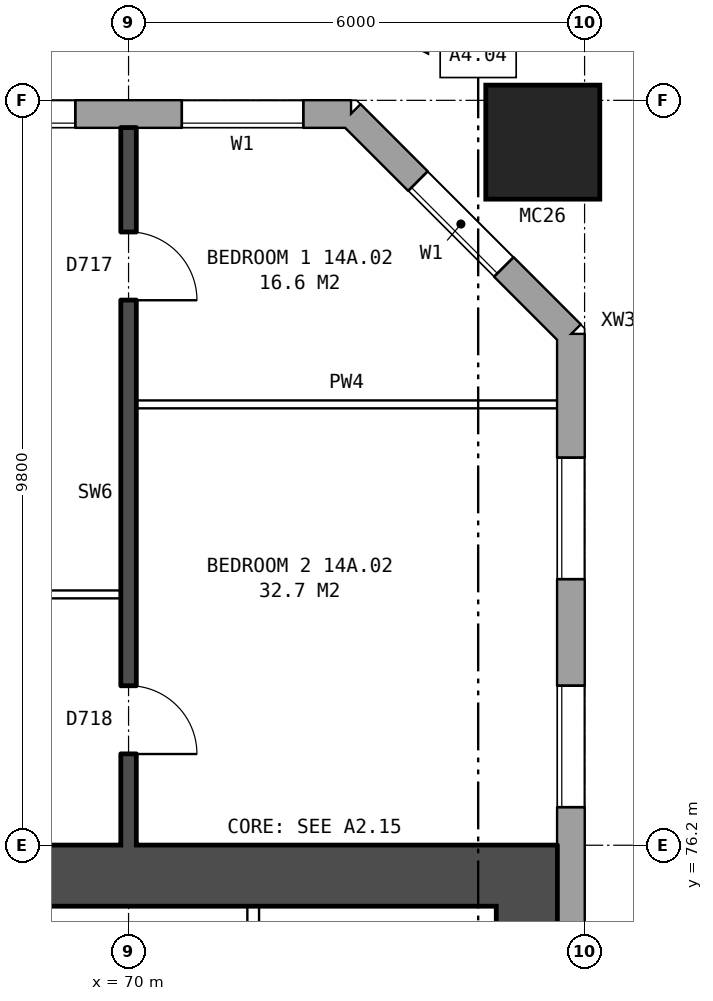
"""IFC4 building model, lengths in metres.
Left out: names, types, materials, properties, quantities, classifications, styles, units other than length and angle.
Written with IfcOpenShell. Run it as: python <this file> out.ifc"""

import sys

from ifc_helpers import new_model, si_unit, direction, frame, frame_2d, origin, origin_2d, place, context, subcontext, project, spatial, rectangle, hollow_rectangle, extrude, element, fill, save


model = new_model("IFC4")
c1 = context("Model", 3, precision=1e-05, world=origin(), true_north=direction((0.0, 1.0)))
c2 = subcontext(c1, "Body", "Model", "MODEL_VIEW")
j1 = project(units=[si_unit("LENGTHUNIT", "METRE"), si_unit("PLANEANGLEUNIT", "RADIAN")], contexts=[c1])
p1 = place(None, origin())
s1 = spatial("IfcSite", under=j1, at=p1, CompositionType="ELEMENT")
p2 = place(p1, origin())
s2 = spatial("IfcBuilding", under=s1, at=p2, CompositionType="ELEMENT")
p3 = place(p2, frame((0.0, 0.0, 53.6)))
s3 = spatial("IfcBuildingStorey", under=s2, at=p3, CompositionType="ELEMENT", Elevation=53.6)
p4 = place(p3, frame((75.45, 85.45, 0.0), z_axis=(0.0, 0.0, 1.0), x_axis=(1.0, 0.0, 0.0)))
e1 = element("IfcColumn", 1, at=p4, inside=s3, PredefinedType="COLUMN", context=c2, shape_type="SweptSolid", body=[
    extrude(hollow_rectangle(XDim=1.5, YDim=1.5, WallThickness=0.08, at=origin_2d()), origin(), (0.0, 0.0, 1.0), 3.1),
])
p5 = place(p3, frame((75.82, 57.075, 0.0), z_axis=(0.0, 0.0, 1.0), x_axis=(0.0, 1.0, 0.0)))
e2 = element("IfcWall", 2, at=p5, inside=s3, PredefinedType="STANDARD", context=c2, shape_type="SweptSolid", body=[
    extrude(rectangle(XDim=25.851, YDim=0.36, at=frame_2d((12.925, 0.0))), origin(), (0.0, 0.0, 1.0), 2.85),
])
p6 = place(p5, frame((1.625, 0.0, 0.8)))
e3 = element("IfcOpeningElement", 3, at=p6, cuts=e2, PredefinedType="OPENING", context=c2, shape_type="SweptSolid", body=[
    extrude(rectangle(XDim=1.6, YDim=1.8, at=frame_2d((0.8, 0.9))), frame((0.0, 0.19, 0.0), z_axis=(0.0, -1.0, 0.0), x_axis=(1.0, 0.0, 0.0)), (0.0, 0.0, 1.0), 0.38),
])
p7 = place(p5, frame((4.625, 0.0, 0.8)))
e4 = element("IfcOpeningElement", 4, at=p7, cuts=e2, PredefinedType="OPENING", context=c2, shape_type="SweptSolid", body=[
    extrude(rectangle(XDim=1.6, YDim=1.8, at=frame_2d((0.8, 0.9))), frame((0.0, 0.19, 0.0), z_axis=(0.0, -1.0, 0.0), x_axis=(1.0, 0.0, 0.0)), (0.0, 0.0, 1.0), 0.38),
])
p8 = place(p5, frame((19.625, 0.0, 0.8)))
e5 = element("IfcOpeningElement", 5, at=p8, cuts=e2, PredefinedType="OPENING", context=c2, shape_type="SweptSolid", body=[
    extrude(rectangle(XDim=1.6, YDim=1.8, at=frame_2d((0.8, 0.9))), frame((0.0, 0.19, 0.0), z_axis=(0.0, -1.0, 0.0), x_axis=(1.0, 0.0, 0.0)), (0.0, 0.0, 1.0), 0.38),
])
p9 = place(p5, frame((22.625, 0.0, 0.8)))
e6 = element("IfcOpeningElement", 6, at=p9, cuts=e2, PredefinedType="OPENING", context=c2, shape_type="SweptSolid", body=[
    extrude(rectangle(XDim=1.6, YDim=1.8, at=frame_2d((0.8, 0.9))), frame((0.0, 0.19, 0.0), z_axis=(0.0, -1.0, 0.0), x_axis=(1.0, 0.0, 0.0)), (0.0, 0.0, 1.0), 0.38),
])
p10 = place(p3, frame((75.82, 82.925, 0.0), z_axis=(0.0, 0.0, 1.0), x_axis=(-0.707106781187, 0.707106781187, 0.0)))
e7 = element("IfcWall", 7, at=p10, inside=s3, PredefinedType="STANDARD", context=c2, shape_type="SweptSolid", body=[
    extrude(rectangle(XDim=4.094, YDim=0.36, at=frame_2d((2.047, 0.0))), origin(), (0.0, 0.0, 1.0), 2.85),
])
p11 = place(p10, frame((1.247, 0.0, 0.8)))
e8 = element("IfcOpeningElement", 8, at=p11, cuts=e7, PredefinedType="OPENING", context=c2, shape_type="SweptSolid", body=[
    extrude(rectangle(XDim=1.6, YDim=1.8, at=frame_2d((0.8, 0.9))), frame((0.0, 0.19, 0.0), z_axis=(0.0, -1.0, 0.0), x_axis=(1.0, 0.0, 0.0)), (0.0, 0.0, 1.0), 0.38),
])
p12 = place(p3, frame((72.925, 85.82, 0.0), z_axis=(0.0, 0.0, 1.0), x_axis=(-1.0, 0.0, 0.0)))
e9 = element("IfcWall", 9, at=p12, inside=s3, PredefinedType="STANDARD", context=c2, shape_type="SweptSolid", body=[
    extrude(rectangle(XDim=48.351, YDim=0.36, at=frame_2d((24.175, 0.0))), origin(), (0.0, 0.0, 1.0), 2.85),
])
p13 = place(p12, frame((0.625, 0.0, 0.8)))
e10 = element("IfcOpeningElement", 10, at=p13, cuts=e9, PredefinedType="OPENING", context=c2, shape_type="SweptSolid", body=[
    extrude(rectangle(XDim=1.6, YDim=1.8, at=frame_2d((0.8, 0.9))), frame((0.0, 0.19, 0.0), z_axis=(0.0, -1.0, 0.0), x_axis=(1.0, 0.0, 0.0)), (0.0, 0.0, 1.0), 0.38),
])
p14 = place(p12, frame((3.625, 0.0, 0.8)))
e11 = element("IfcOpeningElement", 11, at=p14, cuts=e9, PredefinedType="OPENING", context=c2, shape_type="SweptSolid", body=[
    extrude(rectangle(XDim=1.6, YDim=1.8, at=frame_2d((0.8, 0.9))), frame((0.0, 0.19, 0.0), z_axis=(0.0, -1.0, 0.0), x_axis=(1.0, 0.0, 0.0)), (0.0, 0.0, 1.0), 0.38),
])
p15 = place(p12, frame((6.625, 0.0, 0.8)))
e12 = element("IfcOpeningElement", 12, at=p15, cuts=e9, PredefinedType="OPENING", context=c2, shape_type="SweptSolid", body=[
    extrude(rectangle(XDim=1.6, YDim=1.8, at=frame_2d((0.8, 0.9))), frame((0.0, 0.19, 0.0), z_axis=(0.0, -1.0, 0.0), x_axis=(1.0, 0.0, 0.0)), (0.0, 0.0, 1.0), 0.38),
])
p16 = place(p12, frame((9.625, 0.0, 0.8)))
e13 = element("IfcOpeningElement", 13, at=p16, cuts=e9, PredefinedType="OPENING", context=c2, shape_type="SweptSolid", body=[
    extrude(rectangle(XDim=1.6, YDim=1.8, at=frame_2d((0.8, 0.9))), frame((0.0, 0.19, 0.0), z_axis=(0.0, -1.0, 0.0), x_axis=(1.0, 0.0, 0.0)), (0.0, 0.0, 1.0), 0.38),
])
p17 = place(p12, frame((12.075, 0.0, 1.55)))
e14 = element("IfcOpeningElement", 14, at=p17, cuts=e9, PredefinedType="OPENING", context=c2, shape_type="SweptSolid", body=[
    extrude(rectangle(XDim=0.6, YDim=0.9, at=frame_2d((0.3, 0.45))), frame((0.0, 0.19, 0.0), z_axis=(0.0, -1.0, 0.0), x_axis=(1.0, 0.0, 0.0)), (0.0, 0.0, 1.0), 0.38),
])
p18 = place(p12, frame((15.625, 0.0, 0.8)))
e15 = element("IfcOpeningElement", 15, at=p18, cuts=e9, PredefinedType="OPENING", context=c2, shape_type="SweptSolid", body=[
    extrude(rectangle(XDim=1.6, YDim=1.8, at=frame_2d((0.8, 0.9))), frame((0.0, 0.19, 0.0), z_axis=(0.0, -1.0, 0.0), x_axis=(1.0, 0.0, 0.0)), (0.0, 0.0, 1.0), 0.38),
])
p19 = place(p12, frame((18.625, 0.0, 0.8)))
e16 = element("IfcOpeningElement", 16, at=p19, cuts=e9, PredefinedType="OPENING", context=c2, shape_type="SweptSolid", body=[
    extrude(rectangle(XDim=1.6, YDim=1.8, at=frame_2d((0.8, 0.9))), frame((0.0, 0.19, 0.0), z_axis=(0.0, -1.0, 0.0), x_axis=(1.0, 0.0, 0.0)), (0.0, 0.0, 1.0), 0.38),
])
p20 = place(p12, frame((21.625, 0.0, 0.8)))
e17 = element("IfcOpeningElement", 17, at=p20, cuts=e9, PredefinedType="OPENING", context=c2, shape_type="SweptSolid", body=[
    extrude(rectangle(XDim=1.6, YDim=1.8, at=frame_2d((0.8, 0.9))), frame((0.0, 0.19, 0.0), z_axis=(0.0, -1.0, 0.0), x_axis=(1.0, 0.0, 0.0)), (0.0, 0.0, 1.0), 0.38),
])
p21 = place(p12, frame((24.625, 0.0, 0.8)))
e18 = element("IfcOpeningElement", 18, at=p21, cuts=e9, PredefinedType="OPENING", context=c2, shape_type="SweptSolid", body=[
    extrude(rectangle(XDim=1.6, YDim=1.8, at=frame_2d((0.8, 0.9))), frame((0.0, 0.19, 0.0), z_axis=(0.0, -1.0, 0.0), x_axis=(1.0, 0.0, 0.0)), (0.0, 0.0, 1.0), 0.38),
])
p22 = place(p12, frame((27.625, 0.0, 0.8)))
e19 = element("IfcOpeningElement", 19, at=p22, cuts=e9, PredefinedType="OPENING", context=c2, shape_type="SweptSolid", body=[
    extrude(rectangle(XDim=1.6, YDim=1.8, at=frame_2d((0.8, 0.9))), frame((0.0, 0.19, 0.0), z_axis=(0.0, -1.0, 0.0), x_axis=(1.0, 0.0, 0.0)), (0.0, 0.0, 1.0), 0.38),
])
p23 = place(p12, frame((30.625, 0.0, 0.8)))
e20 = element("IfcOpeningElement", 20, at=p23, cuts=e9, PredefinedType="OPENING", context=c2, shape_type="SweptSolid", body=[
    extrude(rectangle(XDim=1.6, YDim=1.8, at=frame_2d((0.8, 0.9))), frame((0.0, 0.19, 0.0), z_axis=(0.0, -1.0, 0.0), x_axis=(1.0, 0.0, 0.0)), (0.0, 0.0, 1.0), 0.38),
])
p24 = place(p12, frame((33.125, 0.0, 0.25)))
e21 = element("IfcOpeningElement", 21, at=p24, cuts=e9, PredefinedType="OPENING", context=c2, shape_type="SweptSolid", body=[
    extrude(rectangle(XDim=0.8, YDim=1.5, at=frame_2d((0.4, 0.75))), frame((0.0, 0.19, 0.0), z_axis=(0.0, -1.0, 0.0), x_axis=(1.0, 0.0, 0.0)), (0.0, 0.0, 1.0), 0.38),
])
p25 = place(p12, frame((36.625, 0.0, 0.8)))
e22 = element("IfcOpeningElement", 22, at=p25, cuts=e9, PredefinedType="OPENING", context=c2, shape_type="SweptSolid", body=[
    extrude(rectangle(XDim=1.6, YDim=1.8, at=frame_2d((0.8, 0.9))), frame((0.0, 0.19, 0.0), z_axis=(0.0, -1.0, 0.0), x_axis=(1.0, 0.0, 0.0)), (0.0, 0.0, 1.0), 0.38),
])
p26 = place(p12, frame((39.625, 0.0, 0.8)))
e23 = element("IfcOpeningElement", 23, at=p26, cuts=e9, PredefinedType="OPENING", context=c2, shape_type="SweptSolid", body=[
    extrude(rectangle(XDim=1.6, YDim=1.8, at=frame_2d((0.8, 0.9))), frame((0.0, 0.19, 0.0), z_axis=(0.0, -1.0, 0.0), x_axis=(1.0, 0.0, 0.0)), (0.0, 0.0, 1.0), 0.38),
])
p27 = place(p12, frame((42.625, 0.0, 0.8)))
e24 = element("IfcOpeningElement", 24, at=p27, cuts=e9, PredefinedType="OPENING", context=c2, shape_type="SweptSolid", body=[
    extrude(rectangle(XDim=1.6, YDim=1.8, at=frame_2d((0.8, 0.9))), frame((0.0, 0.19, 0.0), z_axis=(0.0, -1.0, 0.0), x_axis=(1.0, 0.0, 0.0)), (0.0, 0.0, 1.0), 0.38),
])
p28 = place(p12, frame((45.625, 0.0, 0.8)))
e25 = element("IfcOpeningElement", 25, at=p28, cuts=e9, PredefinedType="OPENING", context=c2, shape_type="SweptSolid", body=[
    extrude(rectangle(XDim=1.6, YDim=1.8, at=frame_2d((0.8, 0.9))), frame((0.0, 0.19, 0.0), z_axis=(0.0, -1.0, 0.0), x_axis=(1.0, 0.0, 0.0)), (0.0, 0.0, 1.0), 0.38),
])
p29 = place(p12, frame((13.325, 0.0, 0.15)))
e26 = element("IfcOpeningElement", 26, at=p29, cuts=e9, PredefinedType="OPENING", context=c2, shape_type="SweptSolid", body=[
    extrude(rectangle(XDim=1.4, YDim=0.9, at=frame_2d((0.7, 0.45))), frame((0.0, 0.19, 0.0), z_axis=(0.0, -1.0, 0.0), x_axis=(1.0, 0.0, 0.0)), (0.0, 0.0, 1.0), 0.38),
])
p30 = place(p12, frame((34.225, 0.0, 0.25)))
e27 = element("IfcOpeningElement", 27, at=p30, cuts=e9, PredefinedType="OPENING", context=c2, shape_type="SweptSolid", body=[
    extrude(rectangle(XDim=0.6, YDim=0.9, at=frame_2d((0.3, 0.45))), frame((0.0, 0.19, 0.0), z_axis=(0.0, -1.0, 0.0), x_axis=(1.0, 0.0, 0.0)), (0.0, 0.0, 1.0), 0.38),
])
p31 = place(p3, frame((75.24, 64.6, 0.0), z_axis=(0.0, 0.0, 1.0), x_axis=(0.0, 1.0, 0.0)))
e28 = element("IfcWall", 28, at=p31, inside=s3, PredefinedType="SHEAR", context=c2, shape_type="SweptSolid", body=[
    extrude(rectangle(XDim=10.8, YDim=0.8, at=frame_2d((5.4, 0.0))), origin(), (0.0, 0.0, 1.0), 2.85),
])
p32 = place(p3, frame((66.64, 75.8, 0.0), z_axis=(0.0, 0.0, 1.0), x_axis=(1.0, 0.0, 0.0)))
e29 = element("IfcWall", 29, at=p32, inside=s3, PredefinedType="SHEAR", context=c2, shape_type="SweptSolid", body=[
    extrude(rectangle(XDim=9.0, YDim=0.8, at=frame_2d((4.5, 0.0))), origin(), (0.0, 0.0, 1.0), 2.85),
])
p33 = place(p3, frame((71.64, 73.45, 0.0), z_axis=(0.0, 0.0, 1.0), x_axis=(0.0, 1.0, 0.0)))
e30 = element("IfcWall", 30, at=p33, inside=s3, PredefinedType="PARTITIONING", context=c2, shape_type="SweptSolid", body=[
    extrude(rectangle(XDim=1.95, YDim=0.15, at=frame_2d((0.975, 0.0))), origin(), (0.0, 0.0, 1.0), 2.85),
])
p34 = place(p33, frame((0.55, 0.0, 0.0)))
e31 = element("IfcOpeningElement", 31, at=p34, cuts=e30, PredefinedType="OPENING", context=c2, shape_type="SweptSolid", body=[
    extrude(rectangle(XDim=0.85, YDim=2.1, at=frame_2d((0.425, 1.05))), frame((0.0, 0.085, 0.0), z_axis=(0.0, -1.0, 0.0), x_axis=(1.0, 0.0, 0.0)), (0.0, 0.0, 1.0), 0.17),
])
p35 = place(p3, frame((64.1, 79.5, 0.0), z_axis=(0.0, 0.0, 1.0), x_axis=(1.0, 0.0, 0.0)))
e32 = element("IfcWall", 32, at=p35, inside=s3, PredefinedType="PARTITIONING", context=c2, shape_type="SweptSolid", body=[
    extrude(rectangle(XDim=5.8, YDim=0.1, at=frame_2d((2.9, 0.0))), origin(), (0.0, 0.0, 1.0), 2.85),
])
p36 = place(p35, frame((3.6, 0.0, 0.0)))
e33 = element("IfcOpeningElement", 33, at=p36, cuts=e32, PredefinedType="OPENING", context=c2, shape_type="SweptSolid", body=[
    extrude(rectangle(XDim=0.9, YDim=2.1, at=frame_2d((0.45, 1.05))), frame((0.0, 0.06, 0.0), z_axis=(0.0, -1.0, 0.0), x_axis=(1.0, 0.0, 0.0)), (0.0, 0.0, 1.0), 0.12),
])
p37 = place(p35, frame((0.7, 0.0, 0.0)))
e34 = element("IfcOpeningElement", 34, at=p37, cuts=e32, PredefinedType="OPENING", context=c2, shape_type="SweptSolid", body=[
    extrude(rectangle(XDim=0.9, YDim=2.1, at=frame_2d((0.45, 1.05))), frame((0.0, 0.06, 0.0), z_axis=(0.0, -1.0, 0.0), x_axis=(1.0, 0.0, 0.0)), (0.0, 0.0, 1.0), 0.12),
])
p38 = place(p3, frame((70.1, 82.0, 0.0), z_axis=(0.0, 0.0, 1.0), x_axis=(1.0, 0.0, 0.0)))
e35 = element("IfcWall", 35, at=p38, inside=s3, PredefinedType="PARTITIONING", context=c2, shape_type="SweptSolid", body=[
    extrude(rectangle(XDim=5.54, YDim=0.1, at=frame_2d((2.77, 0.0))), origin(), (0.0, 0.0, 1.0), 2.85),
])
p39 = place(p3, frame((70.0, 76.2, 0.0), z_axis=(0.0, 0.0, 1.0), x_axis=(0.0, 1.0, 0.0)))
e36 = element("IfcWall", 36, at=p39, inside=s3, PredefinedType="SOLIDWALL", context=c2, shape_type="SweptSolid", body=[
    extrude(rectangle(XDim=9.44, YDim=0.2, at=frame_2d((4.72, 0.0))), origin(), (0.0, 0.0, 1.0), 2.85),
])
p40 = place(p39, frame((7.17, 0.0, 0.0)))
e37 = element("IfcOpeningElement", 37, at=p40, cuts=e36, PredefinedType="OPENING", context=c2, shape_type="SweptSolid", body=[
    extrude(rectangle(XDim=0.9, YDim=2.1, at=frame_2d((0.45, 1.05))), frame((0.0, 0.11, 0.0), z_axis=(0.0, -1.0, 0.0), x_axis=(1.0, 0.0, 0.0)), (0.0, 0.0, 1.0), 0.22),
])
p41 = place(p39, frame((1.2, 0.0, 0.0)))
e38 = element("IfcOpeningElement", 38, at=p41, cuts=e36, PredefinedType="OPENING", context=c2, shape_type="SweptSolid", body=[
    extrude(rectangle(XDim=0.9, YDim=2.1, at=frame_2d((0.45, 1.05))), frame((0.0, 0.11, 0.0), z_axis=(0.0, -1.0, 0.0), x_axis=(1.0, 0.0, 0.0)), (0.0, 0.0, 1.0), 0.22),
])
p42 = place(p8, origin())
e39 = element("IfcWindow", 39, at=p42, inside=s3, PartitioningType="SINGLE_PANEL", PredefinedType="WINDOW", context=c2, shape_type="SweptSolid", body=[
    extrude(rectangle(XDim=1.6, YDim=1.8, at=frame_2d((0.8, 0.9))), frame((0.0, 0.15, 0.0), z_axis=(0.0, -1.0, 0.0), x_axis=(1.0, 0.0, 0.0)), (0.0, 0.0, 1.0), 0.06),
])
fill(e5, e39)
p43 = place(p9, origin())
e40 = element("IfcWindow", 40, at=p43, inside=s3, PartitioningType="SINGLE_PANEL", PredefinedType="WINDOW", context=c2, shape_type="SweptSolid", body=[
    extrude(rectangle(XDim=1.6, YDim=1.8, at=frame_2d((0.8, 0.9))), frame((0.0, 0.15, 0.0), z_axis=(0.0, -1.0, 0.0), x_axis=(1.0, 0.0, 0.0)), (0.0, 0.0, 1.0), 0.06),
])
fill(e6, e40)
p44 = place(p11, origin())
e41 = element("IfcWindow", 41, at=p44, inside=s3, PartitioningType="SINGLE_PANEL", PredefinedType="WINDOW", context=c2, shape_type="SweptSolid", body=[
    extrude(rectangle(XDim=1.6, YDim=1.8, at=frame_2d((0.8, 0.9))), frame((0.0, 0.15, 0.0), z_axis=(0.0, -1.0, 0.0), x_axis=(1.0, 0.0, 0.0)), (0.0, 0.0, 1.0), 0.06),
])
fill(e8, e41)
p45 = place(p13, origin())
e42 = element("IfcWindow", 42, at=p45, inside=s3, PartitioningType="SINGLE_PANEL", PredefinedType="WINDOW", context=c2, shape_type="SweptSolid", body=[
    extrude(rectangle(XDim=1.6, YDim=1.8, at=frame_2d((0.8, 0.9))), frame((0.0, 0.15, 0.0), z_axis=(0.0, -1.0, 0.0), x_axis=(1.0, 0.0, 0.0)), (0.0, 0.0, 1.0), 0.06),
])
fill(e10, e42)
p46 = place(p14, origin())
e43 = element("IfcWindow", 43, at=p46, inside=s3, PartitioningType="SINGLE_PANEL", PredefinedType="WINDOW", context=c2, shape_type="SweptSolid", body=[
    extrude(rectangle(XDim=1.6, YDim=1.8, at=frame_2d((0.8, 0.9))), frame((0.0, 0.15, 0.0), z_axis=(0.0, -1.0, 0.0), x_axis=(1.0, 0.0, 0.0)), (0.0, 0.0, 1.0), 0.06),
])
fill(e11, e43)
p47 = place(p40, frame((0.9, 0.0, 0.0), z_axis=(0.0, 0.0, 1.0), x_axis=(-1.0, 0.0, 0.0)))
e44 = element("IfcDoor", 44, at=p47, inside=s3, OperationType="SINGLE_SWING_RIGHT", PredefinedType="DOOR", context=c2, shape_type="SweptSolid", body=[
    extrude(rectangle(XDim=0.9, YDim=2.1, at=frame_2d((0.45, 1.05))), frame((0.0, 0.025, 0.0), z_axis=(0.0, -1.0, 0.0), x_axis=(1.0, 0.0, 0.0)), (0.0, 0.0, 1.0), 0.05),
])
fill(e37, e44)
p48 = place(p41, frame((0.9, 0.0, 0.0), z_axis=(0.0, 0.0, 1.0), x_axis=(-1.0, 0.0, 0.0)))
e45 = element("IfcDoor", 45, at=p48, inside=s3, OperationType="SINGLE_SWING_RIGHT", PredefinedType="DOOR", context=c2, shape_type="SweptSolid", body=[
    extrude(rectangle(XDim=0.9, YDim=2.1, at=frame_2d((0.45, 1.05))), frame((0.0, 0.025, 0.0), z_axis=(0.0, -1.0, 0.0), x_axis=(1.0, 0.0, 0.0)), (0.0, 0.0, 1.0), 0.05),
])
fill(e38, e45)
save(model, sys.argv[1])
